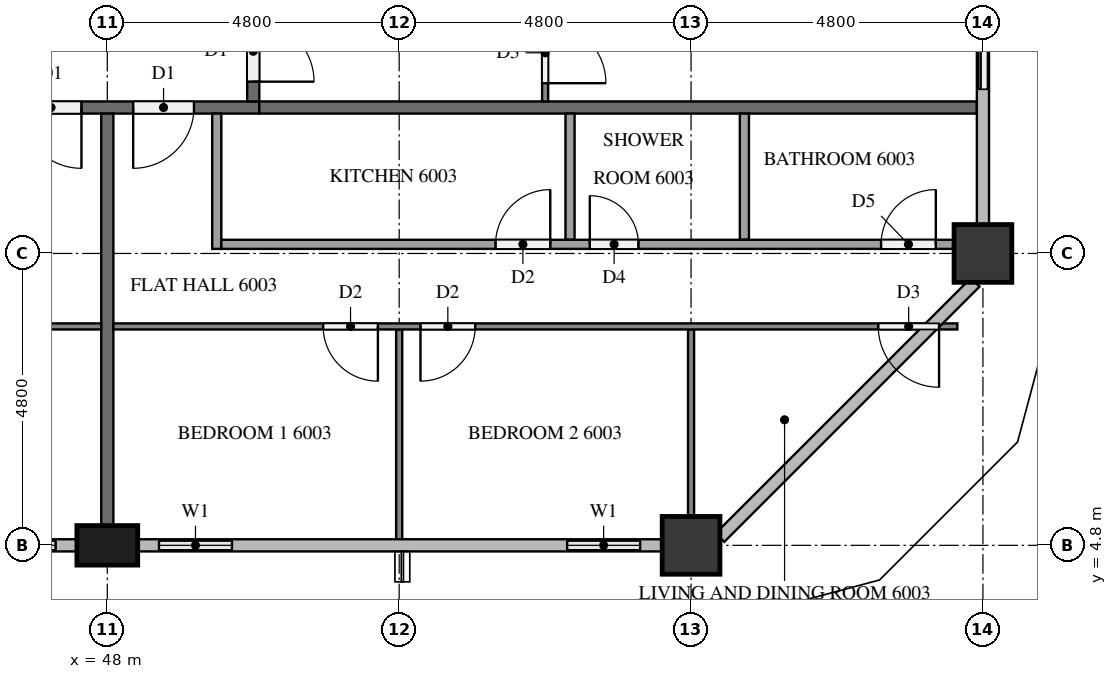
"""IFC4 building model, lengths in metres.
Left out: names, types, materials, properties, quantities, classifications, styles, units other than length and angle.
Written with IfcOpenShell. Run it as: python <this file> out.ifc"""

import sys

from ifc_helpers import new_model, si_unit, direction, frame, frame_2d, origin, origin_2d, place, context, subcontext, project, spatial, rectangle, extrude, element, fill, save


model = new_model("IFC4")
c1 = context("Model", 3, precision=1e-05, world=origin(), true_north=direction((0.0, 1.0)))
c2 = subcontext(c1, "Body", "Model", "MODEL_VIEW")
j1 = project(units=[si_unit("LENGTHUNIT", "METRE"), si_unit("PLANEANGLEUNIT", "RADIAN")], contexts=[c1])
p1 = place(None, origin())
s1 = spatial("IfcSite", under=j1, at=p1, CompositionType="ELEMENT")
p2 = place(p1, origin())
s2 = spatial("IfcBuilding", under=s1, at=p2, CompositionType="ELEMENT")
p3 = place(p2, frame((0.0, 0.0, 229.8)))
s3 = spatial("IfcBuildingStorey", under=s2, at=p3, CompositionType="ELEMENT", Elevation=229.8)
p4 = place(p3, frame((48.0, 4.8, 0.0), z_axis=(0.0, 0.0, 1.0), x_axis=(1.0, 0.0, 0.0)))
e1 = element("IfcColumn", 1, at=p4, inside=s3, PredefinedType="COLUMN", context=c2, shape_type="SweptSolid", body=[
    extrude(rectangle(XDim=1.0, YDim=0.65, at=origin_2d()), origin(), (0.0, 0.0, 1.0), 3.1),
])
for number, where, z_axis, x_axis in (
    (2, (57.6, 4.8, 0.0), (0.0, 0.0, 1.0), (1.0, 0.0, 0.0)),
    (3, (62.4, 9.6, 0.0), (0.0, 0.0, 1.0), (1.0, 0.0, 0.0)),
):
    element("IfcColumn", number, at=place(p3, frame(where, z_axis=z_axis, x_axis=x_axis)), inside=s3, PredefinedType="COLUMN", context=c2, shape_type="SweptSolid", body=[
        extrude(rectangle(XDim=0.95, YDim=0.95, at=origin_2d()), origin(), (0.0, 0.0, 1.0), 3.1),
    ])
p5 = place(p3, frame((45.6, 4.8, 0.0), z_axis=(0.0, 0.0, 1.0), x_axis=(1.0, 0.0, 0.0)))
e4 = element("IfcWall", 4, at=p5, inside=s3, PredefinedType="SOLIDWALL", context=c2, shape_type="SweptSolid", body=[
    extrude(rectangle(XDim=1.9, YDim=0.15, at=frame_2d((0.95, 0.0))), origin(), (0.0, 0.0, 1.0), 3.1),
])
p6 = place(p5, frame((0.35, 0.0, 0.9)))
e5 = element("IfcOpeningElement", 5, at=p6, cuts=e4, PredefinedType="OPENING", context=c2, shape_type="SweptSolid", body=[
    extrude(rectangle(XDim=1.2, YDim=1.4, at=frame_2d((0.6, 0.7))), frame((0.0, 0.085, 0.0), z_axis=(0.0, -1.0, 0.0), x_axis=(1.0, 0.0, 0.0)), (0.0, 0.0, 1.0), 0.17),
])
p7 = place(p3, frame((48.5, 4.8, 0.0), z_axis=(0.0, 0.0, 1.0), x_axis=(1.0, 0.0, 0.0)))
e6 = element("IfcWall", 6, at=p7, inside=s3, PredefinedType="SOLIDWALL", context=c2, shape_type="SweptSolid", body=[
    extrude(rectangle(XDim=1.9, YDim=0.15, at=frame_2d((0.95, 0.0))), origin(), (0.0, 0.0, 1.0), 3.1),
])
p8 = place(p7, frame((0.35, 0.0, 0.9)))
e7 = element("IfcOpeningElement", 7, at=p8, cuts=e6, PredefinedType="OPENING", context=c2, shape_type="SweptSolid", body=[
    extrude(rectangle(XDim=1.2, YDim=1.4, at=frame_2d((0.6, 0.7))), frame((0.0, 0.085, 0.0), z_axis=(0.0, -1.0, 0.0), x_axis=(1.0, 0.0, 0.0)), (0.0, 0.0, 1.0), 0.17),
])
p9 = place(p3, frame((55.2, 4.8, 0.0), z_axis=(0.0, 0.0, 1.0), x_axis=(1.0, 0.0, 0.0)))
e8 = element("IfcWall", 8, at=p9, inside=s3, PredefinedType="SOLIDWALL", context=c2, shape_type="SweptSolid", body=[
    extrude(rectangle(XDim=1.925, YDim=0.15, at=frame_2d((0.962, 0.0))), origin(), (0.0, 0.0, 1.0), 3.1),
])
p10 = place(p9, frame((0.363, 0.0, 0.9)))
e9 = element("IfcOpeningElement", 9, at=p10, cuts=e8, PredefinedType="OPENING", context=c2, shape_type="SweptSolid", body=[
    extrude(rectangle(XDim=1.2, YDim=1.4, at=frame_2d((0.6, 0.7))), frame((0.0, 0.085, 0.0), z_axis=(0.0, -1.0, 0.0), x_axis=(1.0, 0.0, 0.0)), (0.0, 0.0, 1.0), 0.17),
])
p11 = place(p3, frame((62.4, 12.0, 0.0), z_axis=(0.0, 0.0, 1.0), x_axis=(0.0, 1.0, 0.0)))
e10 = element("IfcWall", 10, at=p11, inside=s3, PredefinedType="SOLIDWALL", context=c2, shape_type="SweptSolid", body=[
    extrude(rectangle(XDim=2.4, YDim=0.15, at=frame_2d((1.2, 0.0))), origin(), (0.0, 0.0, 1.0), 3.1),
])
p12 = place(p11, frame((0.3, 0.0, 0.0)))
e11 = element("IfcOpeningElement", 11, at=p12, cuts=e10, PredefinedType="OPENING", context=c2, shape_type="SweptSolid", body=[
    extrude(rectangle(XDim=1.8, YDim=2.4, at=frame_2d((0.9, 1.2))), frame((0.0, 0.085, 0.0), z_axis=(0.0, -1.0, 0.0), x_axis=(1.0, 0.0, 0.0)), (0.0, 0.0, 1.0), 0.17),
])
p13 = place(p3, frame((50.5, 12.0, 0.0), z_axis=(0.0, 0.0, 1.0), x_axis=(-1.0, 0.0, 0.0)))
e12 = element("IfcWall", 12, at=p13, inside=s3, PredefinedType="PARTITIONING", context=c2, shape_type="SweptSolid", body=[
    extrude(rectangle(XDim=38.6, YDim=0.2, at=frame_2d((19.3, 0.0))), origin(), (0.0, 0.0, 1.0), 3.1),
])
p14 = place(p13, frame((19.675, 0.0, 0.0)))
e13 = element("IfcOpeningElement", 13, at=p14, cuts=e12, PredefinedType="OPENING", context=c2, shape_type="SweptSolid", body=[
    extrude(rectangle(XDim=1.1, YDim=2.1, at=frame_2d((0.55, 1.05))), frame((0.0, 0.11, 0.0), z_axis=(0.0, -1.0, 0.0), x_axis=(1.0, 0.0, 0.0)), (0.0, 0.0, 1.0), 0.22),
])
p15 = place(p13, frame((2.925, 0.0, 0.0)))
e14 = element("IfcOpeningElement", 14, at=p15, cuts=e12, PredefinedType="OPENING", context=c2, shape_type="SweptSolid", body=[
    extrude(rectangle(XDim=1.0, YDim=2.1, at=frame_2d((0.5, 1.05))), frame((0.0, 0.11, 0.0), z_axis=(0.0, -1.0, 0.0), x_axis=(1.0, 0.0, 0.0)), (0.0, 0.0, 1.0), 0.22),
])
p16 = place(p13, frame((1.075, 0.0, 0.0)))
e15 = element("IfcOpeningElement", 15, at=p16, cuts=e12, PredefinedType="OPENING", context=c2, shape_type="SweptSolid", body=[
    extrude(rectangle(XDim=1.0, YDim=2.1, at=frame_2d((0.5, 1.05))), frame((0.0, 0.11, 0.0), z_axis=(0.0, -1.0, 0.0), x_axis=(1.0, 0.0, 0.0)), (0.0, 0.0, 1.0), 0.22),
])
p17 = place(p3, frame((50.4, 40.7, 0.0), z_axis=(0.0, 0.0, 1.0), x_axis=(0.0, -1.0, 0.0)))
e16 = element("IfcWall", 16, at=p17, inside=s3, PredefinedType="PARTITIONING", context=c2, shape_type="SweptSolid", body=[
    extrude(rectangle(XDim=28.6, YDim=0.2, at=frame_2d((14.3, 0.0))), origin(), (0.0, 0.0, 1.0), 3.1),
])
p18 = place(p17, frame((27.275, 0.0, 0.0)))
e17 = element("IfcOpeningElement", 17, at=p18, cuts=e16, PredefinedType="OPENING", context=c2, shape_type="SweptSolid", body=[
    extrude(rectangle(XDim=1.0, YDim=2.1, at=frame_2d((0.5, 1.05))), frame((0.0, 0.11, 0.0), z_axis=(0.0, -1.0, 0.0), x_axis=(1.0, 0.0, 0.0)), (0.0, 0.0, 1.0), 0.22),
])
p19 = place(p17, frame((2.725, 0.0, 0.0)))
e18 = element("IfcOpeningElement", 18, at=p19, cuts=e16, PredefinedType="OPENING", context=c2, shape_type="SweptSolid", body=[
    extrude(rectangle(XDim=1.0, YDim=2.1, at=frame_2d((0.5, 1.05))), frame((0.0, 0.11, 0.0), z_axis=(0.0, -1.0, 0.0), x_axis=(1.0, 0.0, 0.0)), (0.0, 0.0, 1.0), 0.22),
])
p20 = place(p17, frame((0.875, 0.0, 0.0)))
e19 = element("IfcOpeningElement", 19, at=p20, cuts=e16, PredefinedType="OPENING", context=c2, shape_type="SweptSolid", body=[
    extrude(rectangle(XDim=1.0, YDim=2.1, at=frame_2d((0.5, 1.05))), frame((0.0, 0.11, 0.0), z_axis=(0.0, -1.0, 0.0), x_axis=(1.0, 0.0, 0.0)), (0.0, 0.0, 1.0), 0.22),
])
p21 = place(p3, frame((48.0, 11.9, 0.0), z_axis=(0.0, 0.0, 1.0), x_axis=(0.0, -1.0, 0.0)))
e20 = element("IfcWall", 20, at=p21, inside=s3, PredefinedType="PARTITIONING", context=c2, shape_type="SweptSolid", body=[
    extrude(rectangle(XDim=6.775, YDim=0.2, at=frame_2d((3.387, 0.0))), origin(), (0.0, 0.0, 1.0), 3.1),
])
p22 = place(p3, frame((50.5, 12.0, 0.0), z_axis=(0.0, 0.0, 1.0), x_axis=(1.0, 0.0, 0.0)))
e21 = element("IfcWall", 21, at=p22, inside=s3, PredefinedType="PARTITIONING", context=c2, shape_type="SweptSolid", body=[
    extrude(rectangle(XDim=11.8, YDim=0.2, at=frame_2d((5.9, 0.0))), origin(), (0.0, 0.0, 1.0), 3.1),
])
p23 = place(p3, frame((47.9, 8.4, 0.0), z_axis=(0.0, 0.0, 1.0), x_axis=(-1.0, 0.0, 0.0)))
e22 = element("IfcWall", 22, at=p23, inside=s3, PredefinedType="PARTITIONING", context=c2, shape_type="SweptSolid", body=[
    extrude(rectangle(XDim=16.6, YDim=0.1, at=frame_2d((8.3, 0.0))), origin(), (0.0, 0.0, 1.0), 3.1),
])
p24 = place(p23, frame((3.45, 0.0, 0.0)))
e23 = element("IfcOpeningElement", 23, at=p24, cuts=e22, PredefinedType="OPENING", context=c2, shape_type="SweptSolid", body=[
    extrude(rectangle(XDim=0.9, YDim=2.1, at=frame_2d((0.45, 1.05))), frame((0.0, 0.06, 0.0), z_axis=(0.0, -1.0, 0.0), x_axis=(1.0, 0.0, 0.0)), (0.0, 0.0, 1.0), 0.12),
])
p25 = place(p23, frame((5.05, 0.0, 0.0)))
e24 = element("IfcOpeningElement", 24, at=p25, cuts=e22, PredefinedType="OPENING", context=c2, shape_type="SweptSolid", body=[
    extrude(rectangle(XDim=1.0, YDim=2.1, at=frame_2d((0.5, 1.05))), frame((0.0, 0.06, 0.0), z_axis=(0.0, -1.0, 0.0), x_axis=(1.0, 0.0, 0.0)), (0.0, 0.0, 1.0), 0.12),
])
p26 = place(p23, frame((15.4, 0.0, 0.0)))
e25 = element("IfcOpeningElement", 25, at=p26, cuts=e22, PredefinedType="OPENING", context=c2, shape_type="SweptSolid", body=[
    extrude(rectangle(XDim=0.9, YDim=2.1, at=frame_2d((0.45, 1.05))), frame((0.0, 0.06, 0.0), z_axis=(0.0, -1.0, 0.0), x_axis=(1.0, 0.0, 0.0)), (0.0, 0.0, 1.0), 0.12),
])
p27 = place(p3, frame((52.8, 8.35, 0.0), z_axis=(0.0, 0.0, 1.0), x_axis=(0.0, -1.0, 0.0)))
e26 = element("IfcWall", 26, at=p27, inside=s3, PredefinedType="PARTITIONING", context=c2, shape_type="SweptSolid", body=[
    extrude(rectangle(XDim=3.45, YDim=0.1, at=frame_2d((1.725, 0.0))), origin(), (0.0, 0.0, 1.0), 3.1),
])
p28 = place(p3, frame((57.6, 8.35, 0.0), z_axis=(0.0, 0.0, 1.0), x_axis=(0.0, -1.0, 0.0)))
e27 = element("IfcWall", 27, at=p28, inside=s3, PredefinedType="PARTITIONING", context=c2, shape_type="SweptSolid", body=[
    extrude(rectangle(XDim=3.075, YDim=0.1, at=frame_2d((1.538, 0.0))), origin(), (0.0, 0.0, 1.0), 3.1),
])
p29 = place(p3, frame((61.979, 8.4, 0.0), z_axis=(0.0, 0.0, 1.0), x_axis=(-1.0, 0.0, 0.0)))
e28 = element("IfcWall", 28, at=p29, inside=s3, PredefinedType="PARTITIONING", context=c2, shape_type="SweptSolid", body=[
    extrude(rectangle(XDim=13.878, YDim=0.1, at=frame_2d((6.939, 0.0))), origin(), (0.0, 0.0, 1.0), 3.1),
])
p30 = place(p29, frame((9.529, 0.0, 0.0)))
e29 = element("IfcOpeningElement", 29, at=p30, cuts=e28, PredefinedType="OPENING", context=c2, shape_type="SweptSolid", body=[
    extrude(rectangle(XDim=0.9, YDim=2.1, at=frame_2d((0.45, 1.05))), frame((0.0, 0.06, 0.0), z_axis=(0.0, -1.0, 0.0), x_axis=(1.0, 0.0, 0.0)), (0.0, 0.0, 1.0), 0.12),
])
p31 = place(p29, frame((7.928, 0.0, 0.0)))
e30 = element("IfcOpeningElement", 30, at=p31, cuts=e28, PredefinedType="OPENING", context=c2, shape_type="SweptSolid", body=[
    extrude(rectangle(XDim=0.9, YDim=2.1, at=frame_2d((0.45, 1.05))), frame((0.0, 0.06, 0.0), z_axis=(0.0, -1.0, 0.0), x_axis=(1.0, 0.0, 0.0)), (0.0, 0.0, 1.0), 0.12),
])
p32 = place(p29, frame((0.3, 0.0, 0.0)))
e31 = element("IfcOpeningElement", 31, at=p32, cuts=e28, PredefinedType="OPENING", context=c2, shape_type="SweptSolid", body=[
    extrude(rectangle(XDim=1.0, YDim=2.1, at=frame_2d((0.5, 1.05))), frame((0.0, 0.06, 0.0), z_axis=(0.0, -1.0, 0.0), x_axis=(1.0, 0.0, 0.0)), (0.0, 0.0, 1.0), 0.12),
])
for number, where, z_axis, x_axis in (
    (32, (55.61, 11.9, 0.0), (0.0, 0.0, 1.0), (0.0, -1.0, 0.0)),
    (33, (58.477, 11.9, 0.0), (0.0, 0.0, 1.0), (0.0, -1.0, 0.0)),
):
    element("IfcWall", number, at=place(p3, frame(where, z_axis=z_axis, x_axis=x_axis)), inside=s3, PredefinedType="PARTITIONING", context=c2, shape_type="SweptSolid", body=[
        extrude(rectangle(XDim=2.075, YDim=0.15, at=frame_2d((1.038, 0.0))), origin(), (0.0, 0.0, 1.0), 3.1),
    ])
p33 = place(p3, frame((49.8, 11.9, 0.0), z_axis=(0.0, 0.0, 1.0), x_axis=(0.0, -1.0, 0.0)))
e34 = element("IfcWall", 34, at=p33, inside=s3, PredefinedType="PARTITIONING", context=c2, shape_type="SweptSolid", body=[
    extrude(rectangle(XDim=2.225, YDim=0.15, at=frame_2d((1.112, 0.0))), origin(), (0.0, 0.0, 1.0), 3.1),
])
p34 = place(p3, frame((49.875, 9.75, 0.0), z_axis=(0.0, 0.0, 1.0), x_axis=(1.0, 0.0, 0.0)))
e35 = element("IfcWall", 35, at=p34, inside=s3, PredefinedType="PARTITIONING", context=c2, shape_type="SweptSolid", body=[
    extrude(rectangle(XDim=12.05, YDim=0.15, at=frame_2d((6.025, 0.0))), origin(), (0.0, 0.0, 1.0), 3.1),
])
p35 = place(p34, frame((4.51, 0.0, 0.0)))
e36 = element("IfcOpeningElement", 36, at=p35, cuts=e35, PredefinedType="OPENING", context=c2, shape_type="SweptSolid", body=[
    extrude(rectangle(XDim=0.9, YDim=2.1, at=frame_2d((0.45, 1.05))), frame((0.0, 0.085, 0.0), z_axis=(0.0, -1.0, 0.0), x_axis=(1.0, 0.0, 0.0)), (0.0, 0.0, 1.0), 0.17),
])
p36 = place(p34, frame((6.06, 0.0, 0.0)))
e37 = element("IfcOpeningElement", 37, at=p36, cuts=e35, PredefinedType="OPENING", context=c2, shape_type="SweptSolid", body=[
    extrude(rectangle(XDim=0.8, YDim=2.1, at=frame_2d((0.4, 1.05))), frame((0.0, 0.085, 0.0), z_axis=(0.0, -1.0, 0.0), x_axis=(1.0, 0.0, 0.0)), (0.0, 0.0, 1.0), 0.17),
])
p37 = place(p34, frame((10.85, 0.0, 0.0)))
e38 = element("IfcOpeningElement", 38, at=p37, cuts=e35, PredefinedType="OPENING", context=c2, shape_type="SweptSolid", body=[
    extrude(rectangle(XDim=0.9, YDim=2.1, at=frame_2d((0.45, 1.05))), frame((0.0, 0.085, 0.0), z_axis=(0.0, -1.0, 0.0), x_axis=(1.0, 0.0, 0.0)), (0.0, 0.0, 1.0), 0.17),
])
p38 = place(p3, frame((55.2, 28.7, 0.0), z_axis=(0.0, 0.0, 1.0), x_axis=(0.0, -1.0, 0.0)))
e39 = element("IfcWall", 39, at=p38, inside=s3, PredefinedType="PARTITIONING", context=c2, shape_type="SweptSolid", body=[
    extrude(rectangle(XDim=16.6, YDim=0.1, at=frame_2d((8.3, 0.0))), origin(), (0.0, 0.0, 1.0), 3.1),
])
p39 = place(p38, frame((15.3, 0.0, 0.0)))
e40 = element("IfcOpeningElement", 40, at=p39, cuts=e39, PredefinedType="OPENING", context=c2, shape_type="SweptSolid", body=[
    extrude(rectangle(XDim=1.0, YDim=2.1, at=frame_2d((0.5, 1.05))), frame((0.0, 0.06, 0.0), z_axis=(0.0, -1.0, 0.0), x_axis=(1.0, 0.0, 0.0)), (0.0, 0.0, 1.0), 0.12),
])
p40 = place(p38, frame((5.05, 0.0, 0.0)))
e41 = element("IfcOpeningElement", 41, at=p40, cuts=e39, PredefinedType="OPENING", context=c2, shape_type="SweptSolid", body=[
    extrude(rectangle(XDim=0.9, YDim=2.1, at=frame_2d((0.45, 1.05))), frame((0.0, 0.06, 0.0), z_axis=(0.0, -1.0, 0.0), x_axis=(1.0, 0.0, 0.0)), (0.0, 0.0, 1.0), 0.12),
])
p41 = place(p38, frame((3.45, 0.0, 0.0)))
e42 = element("IfcOpeningElement", 42, at=p41, cuts=e39, PredefinedType="OPENING", context=c2, shape_type="SweptSolid", body=[
    extrude(rectangle(XDim=0.9, YDim=2.1, at=frame_2d((0.45, 1.05))), frame((0.0, 0.06, 0.0), z_axis=(0.0, -1.0, 0.0), x_axis=(1.0, 0.0, 0.0)), (0.0, 0.0, 1.0), 0.12),
])
p42 = place(p6, origin())
e43 = element("IfcWindow", 43, at=p42, inside=s3, PartitioningType="SINGLE_PANEL", PredefinedType="WINDOW", context=c2, shape_type="SweptSolid", body=[
    extrude(rectangle(XDim=1.2, YDim=1.4, at=frame_2d((0.6, 0.7))), frame((0.0, 0.03, 0.0), z_axis=(0.0, -1.0, 0.0), x_axis=(1.0, 0.0, 0.0)), (0.0, 0.0, 1.0), 0.06),
])
fill(e5, e43)
p43 = place(p8, origin())
e44 = element("IfcWindow", 44, at=p43, inside=s3, PartitioningType="SINGLE_PANEL", PredefinedType="WINDOW", context=c2, shape_type="SweptSolid", body=[
    extrude(rectangle(XDim=1.2, YDim=1.4, at=frame_2d((0.6, 0.7))), frame((0.0, 0.03, 0.0), z_axis=(0.0, -1.0, 0.0), x_axis=(1.0, 0.0, 0.0)), (0.0, 0.0, 1.0), 0.06),
])
fill(e7, e44)
p44 = place(p10, origin())
e45 = element("IfcWindow", 45, at=p44, inside=s3, PartitioningType="SINGLE_PANEL", PredefinedType="WINDOW", context=c2, shape_type="SweptSolid", body=[
    extrude(rectangle(XDim=1.2, YDim=1.4, at=frame_2d((0.6, 0.7))), frame((0.0, 0.03, 0.0), z_axis=(0.0, -1.0, 0.0), x_axis=(1.0, 0.0, 0.0)), (0.0, 0.0, 1.0), 0.06),
])
fill(e9, e45)
p45 = place(p12, origin())
e46 = element("IfcDoor", 46, at=p45, inside=s3, OperationType="SLIDING_TO_RIGHT", PredefinedType="DOOR", context=c2, shape_type="SweptSolid", body=[
    extrude(rectangle(XDim=1.8, YDim=2.4, at=frame_2d((0.9, 1.2))), frame((0.0, 0.025, 0.0), z_axis=(0.0, -1.0, 0.0), x_axis=(1.0, 0.0, 0.0)), (0.0, 0.0, 1.0), 0.05),
])
fill(e11, e46)
p46 = place(p15, origin())
e47 = element("IfcDoor", 47, at=p46, inside=s3, OperationType="SINGLE_SWING_LEFT", PredefinedType="DOOR", context=c2, shape_type="SweptSolid", body=[
    extrude(rectangle(XDim=1.0, YDim=2.1, at=frame_2d((0.5, 1.05))), frame((0.0, 0.025, 0.0), z_axis=(0.0, -1.0, 0.0), x_axis=(1.0, 0.0, 0.0)), (0.0, 0.0, 1.0), 0.05),
])
fill(e14, e47)
p47 = place(p16, origin())
e48 = element("IfcDoor", 48, at=p47, inside=s3, OperationType="SINGLE_SWING_RIGHT", PredefinedType="DOOR", context=c2, shape_type="SweptSolid", body=[
    extrude(rectangle(XDim=1.0, YDim=2.1, at=frame_2d((0.5, 1.05))), frame((0.0, 0.025, 0.0), z_axis=(0.0, -1.0, 0.0), x_axis=(1.0, 0.0, 0.0)), (0.0, 0.0, 1.0), 0.05),
])
fill(e15, e48)
p48 = place(p18, origin())
e49 = element("IfcDoor", 49, at=p48, inside=s3, OperationType="SINGLE_SWING_RIGHT", PredefinedType="DOOR", context=c2, shape_type="SweptSolid", body=[
    extrude(rectangle(XDim=1.0, YDim=2.1, at=frame_2d((0.5, 1.05))), frame((0.0, 0.025, 0.0), z_axis=(0.0, -1.0, 0.0), x_axis=(1.0, 0.0, 0.0)), (0.0, 0.0, 1.0), 0.05),
])
fill(e17, e49)
p49 = place(p30, origin())
e50 = element("IfcDoor", 50, at=p49, inside=s3, OperationType="SINGLE_SWING_LEFT", PredefinedType="DOOR", context=c2, shape_type="SweptSolid", body=[
    extrude(rectangle(XDim=0.9, YDim=2.1, at=frame_2d((0.45, 1.05))), frame((0.0, 0.025, 0.0), z_axis=(0.0, -1.0, 0.0), x_axis=(1.0, 0.0, 0.0)), (0.0, 0.0, 1.0), 0.05),
])
fill(e29, e50)
p50 = place(p31, origin())
e51 = element("IfcDoor", 51, at=p50, inside=s3, OperationType="SINGLE_SWING_RIGHT", PredefinedType="DOOR", context=c2, shape_type="SweptSolid", body=[
    extrude(rectangle(XDim=0.9, YDim=2.1, at=frame_2d((0.45, 1.05))), frame((0.0, 0.025, 0.0), z_axis=(0.0, -1.0, 0.0), x_axis=(1.0, 0.0, 0.0)), (0.0, 0.0, 1.0), 0.05),
])
fill(e30, e51)
p51 = place(p32, origin())
e52 = element("IfcDoor", 52, at=p51, inside=s3, OperationType="SINGLE_SWING_LEFT", PredefinedType="DOOR", context=c2, shape_type="SweptSolid", body=[
    extrude(rectangle(XDim=1.0, YDim=2.1, at=frame_2d((0.5, 1.05))), frame((0.0, 0.025, 0.0), z_axis=(0.0, -1.0, 0.0), x_axis=(1.0, 0.0, 0.0)), (0.0, 0.0, 1.0), 0.05),
])
fill(e31, e52)
p52 = place(p35, origin())
e53 = element("IfcDoor", 53, at=p52, inside=s3, OperationType="SINGLE_SWING_RIGHT", PredefinedType="DOOR", context=c2, shape_type="SweptSolid", body=[
    extrude(rectangle(XDim=0.9, YDim=2.1, at=frame_2d((0.45, 1.05))), frame((0.0, 0.025, 0.0), z_axis=(0.0, -1.0, 0.0), x_axis=(1.0, 0.0, 0.0)), (0.0, 0.0, 1.0), 0.05),
])
fill(e36, e53)
p53 = place(p36, origin())
e54 = element("IfcDoor", 54, at=p53, inside=s3, OperationType="SINGLE_SWING_LEFT", PredefinedType="DOOR", context=c2, shape_type="SweptSolid", body=[
    extrude(rectangle(XDim=0.8, YDim=2.1, at=frame_2d((0.4, 1.05))), frame((0.0, 0.025, 0.0), z_axis=(0.0, -1.0, 0.0), x_axis=(1.0, 0.0, 0.0)), (0.0, 0.0, 1.0), 0.05),
])
fill(e37, e54)
p54 = place(p37, origin())
e55 = element("IfcDoor", 55, at=p54, inside=s3, OperationType="SINGLE_SWING_RIGHT", PredefinedType="DOOR", context=c2, shape_type="SweptSolid", body=[
    extrude(rectangle(XDim=0.9, YDim=2.1, at=frame_2d((0.45, 1.05))), frame((0.0, 0.025, 0.0), z_axis=(0.0, -1.0, 0.0), x_axis=(1.0, 0.0, 0.0)), (0.0, 0.0, 1.0), 0.05),
])
fill(e38, e55)
p55 = place(p39, origin())
e56 = element("IfcDoor", 56, at=p55, inside=s3, OperationType="SINGLE_SWING_RIGHT", PredefinedType="DOOR", context=c2, shape_type="SweptSolid", body=[
    extrude(rectangle(XDim=1.0, YDim=2.1, at=frame_2d((0.5, 1.05))), frame((0.0, 0.025, 0.0), z_axis=(0.0, -1.0, 0.0), x_axis=(1.0, 0.0, 0.0)), (0.0, 0.0, 1.0), 0.05),
])
fill(e40, e56)
save(model, sys.argv[1])
